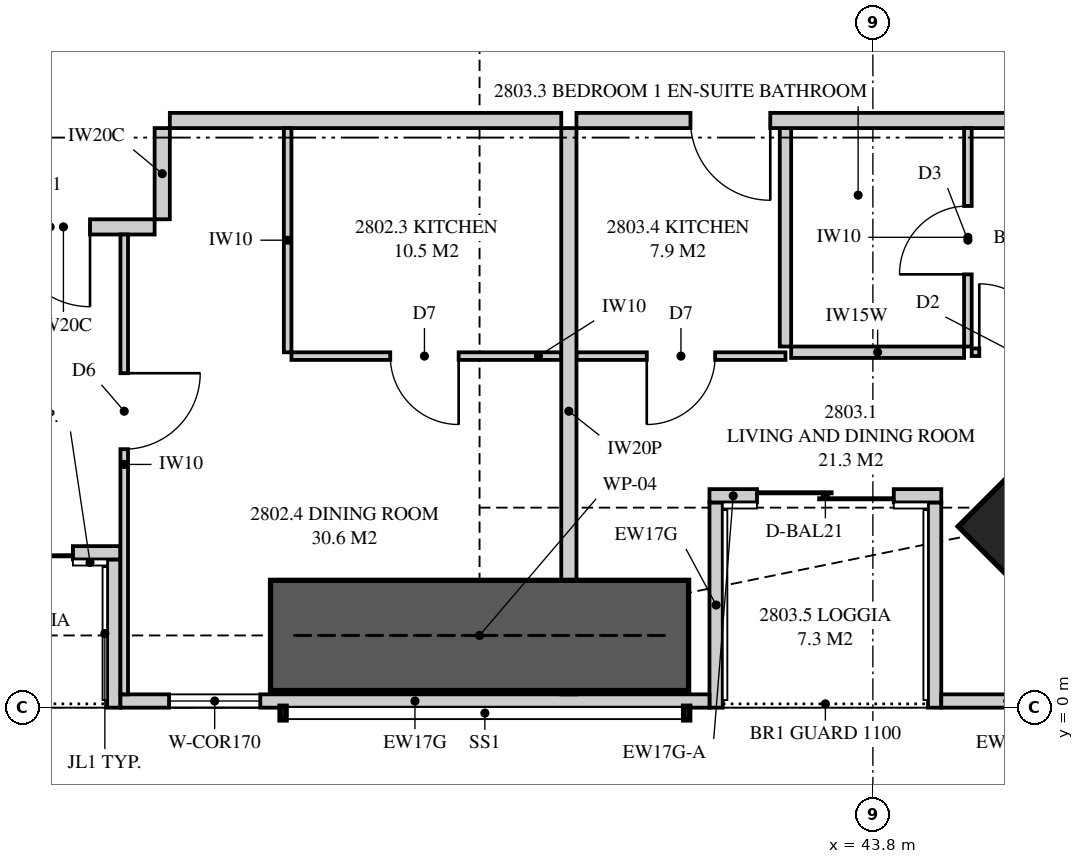
"""IFC4 building model, lengths in metres.
Left out: names, types, materials, properties, quantities, classifications, styles, units other than length and angle.
Written with IfcOpenShell. Run it as: python <this file> out.ifc"""

import sys

from ifc_helpers import new_model, si_unit, direction, frame, frame_2d, origin, origin_2d, place, context, subcontext, project, spatial, polyline, rectangle, outline, extrude, element, fill, save


model = new_model("IFC4")
c1 = context("Model", 3, precision=1e-05, world=origin(), true_north=direction((0.0, 1.0)))
c2 = subcontext(c1, "Body", "Model", "MODEL_VIEW")
j1 = project(units=[si_unit("LENGTHUNIT", "METRE"), si_unit("PLANEANGLEUNIT", "RADIAN")], contexts=[c1])
p1 = place(None, origin())
s1 = spatial("IfcSite", under=j1, at=p1, CompositionType="ELEMENT")
p2 = place(p1, origin())
s2 = spatial("IfcBuilding", under=s1, at=p2, CompositionType="ELEMENT")
p3 = place(p2, frame((0.0, 0.0, 104.85)))
s3 = spatial("IfcBuildingStorey", under=s2, at=p3, CompositionType="ELEMENT", Elevation=104.85)
p4 = place(p3, frame((46.869, 2.631, 0.0), z_axis=(0.0, 0.0, 1.0), x_axis=(-0.707106781187, 0.707106781187, 0.0)))
e1 = element("IfcColumn", 1, at=p4, inside=s3, PredefinedType="COLUMN", context=c2, shape_type="SweptSolid", body=[
    extrude(rectangle(XDim=2.4, YDim=3.1, at=origin_2d()), origin(), (0.0, 0.0, 1.0), 3.35),
])
p5 = place(p3, frame((33.9, 0.087, 0.0), z_axis=(0.0, 0.0, 1.0), x_axis=(1.0, 0.0, 0.0)))
e2 = element("IfcWall", 2, at=p5, inside=s3, PredefinedType="SOLIDWALL", context=c2, shape_type="SweptSolid", body=[
    extrude(outline(polyline([(0.0, 0.0), (7.75, 0.0), (7.75, 3.11), (4.928, 3.11), (4.928, 2.15), (4.883, 2.15), (4.883, 3.11), (4.725, 3.11), (4.725, 2.15), (0.0, 2.15), (0.0, 0.0)])), frame((0.0, 0.087, 0.0), z_axis=(0.0, -1.0, 0.0), x_axis=(1.0, 0.0, 0.0)), (0.0, 0.0, 1.0), 0.175),
])
p6 = place(p5, frame((0.64, 0.0, 0.4)))
e3 = element("IfcOpeningElement", 3, at=p6, cuts=e2, PredefinedType="OPENING", context=c2, shape_type="SweptSolid", body=[
    extrude(rectangle(XDim=1.2, YDim=1.7, at=frame_2d((0.6, 0.85))), frame((0.0, 0.097, 0.0), z_axis=(0.0, -1.0, 0.0), x_axis=(1.0, 0.0, 0.0)), (0.0, 0.0, 1.0), 0.195),
])
p7 = place(p3, frame((44.7, 0.087, 0.0), z_axis=(0.0, 0.0, 1.0), x_axis=(1.0, 0.0, 0.0)))
e4 = element("IfcWall", 4, at=p7, inside=s3, PredefinedType="SOLIDWALL", context=c2, shape_type="SweptSolid", body=[
    extrude(rectangle(XDim=1.749, YDim=0.175, at=frame_2d((0.875, 0.0))), origin(), (0.0, 0.0, 1.0), 3.11),
])
p8 = place(p3, frame((30.85, 2.038, 0.0), z_axis=(0.0, 0.0, 1.0), x_axis=(1.0, 0.0, 0.0)))
e5 = element("IfcWall", 5, at=p8, inside=s3, PredefinedType="SOLIDWALL", context=c2, shape_type="SweptSolid", body=[
    extrude(rectangle(XDim=3.05, YDim=0.175, at=frame_2d((1.525, 0.0))), origin(), (0.0, 0.0, 1.0), 3.11),
])
p9 = place(p8, frame((0.625, 0.0, 0.0)))
e6 = element("IfcOpeningElement", 6, at=p9, cuts=e5, PredefinedType="OPENING", context=c2, shape_type="SweptSolid", body=[
    extrude(rectangle(XDim=1.8, YDim=2.1, at=frame_2d((0.9, 1.05))), frame((0.0, 0.097, 0.0), z_axis=(0.0, -1.0, 0.0), x_axis=(1.0, 0.0, 0.0)), (0.0, 0.0, 1.0), 0.195),
])
p10 = place(p3, frame((33.812, 0.0, 0.0), z_axis=(0.0, 0.0, 1.0), x_axis=(0.0, 1.0, 0.0)))
e7 = element("IfcWall", 7, at=p10, inside=s3, PredefinedType="SOLIDWALL", context=c2, shape_type="SweptSolid", body=[
    extrude(outline(polyline([(0.0, 0.0), (1.95, 0.0), (1.95, 3.11), (1.75, 3.11), (1.75, 2.15), (0.15, 2.15), (0.15, 3.11), (0.0, 3.11), (0.0, 0.0)])), frame((0.0, 0.087, 0.0), z_axis=(0.0, -1.0, 0.0), x_axis=(1.0, 0.0, 0.0)), (0.0, 0.0, 1.0), 0.175),
])
p11 = place(p3, frame((41.65, 2.788, 0.0), z_axis=(0.0, 0.0, 1.0), x_axis=(1.0, 0.0, 0.0)))
e8 = element("IfcWall", 8, at=p11, inside=s3, PredefinedType="SOLIDWALL", context=c2, shape_type="SweptSolid", body=[
    extrude(rectangle(XDim=0.625, YDim=0.175, at=frame_2d((0.312, 0.0))), origin(), (0.0, 0.0, 1.0), 2.51),
])
p12 = place(p3, frame((42.275, 2.788, 0.0), z_axis=(0.0, 0.0, 1.0), x_axis=(1.0, 0.0, 0.0)))
e9 = element("IfcWall", 9, at=p12, inside=s3, PredefinedType="SOLIDWALL", context=c2, shape_type="SweptSolid", body=[
    extrude(rectangle(XDim=2.425, YDim=0.175, at=frame_2d((1.212, 0.0))), origin(), (0.0, 0.0, 1.0), 2.15),
])
p13 = place(p12, origin())
e10 = element("IfcOpeningElement", 10, at=p13, cuts=e9, PredefinedType="OPENING", context=c2, shape_type="SweptSolid", body=[
    extrude(rectangle(XDim=1.8, YDim=2.1, at=frame_2d((0.9, 1.05))), frame((0.0, 0.097, 0.0), z_axis=(0.0, -1.0, 0.0), x_axis=(1.0, 0.0, 0.0)), (0.0, 0.0, 1.0), 0.195),
])
p14 = place(p3, frame((41.738, 0.0, 0.0), z_axis=(0.0, 0.0, 1.0), x_axis=(0.0, 1.0, 0.0)))
e11 = element("IfcWall", 11, at=p14, inside=s3, PredefinedType="SOLIDWALL", context=c2, shape_type="SweptSolid", body=[
    extrude(outline(polyline([(0.0, 0.0), (2.7, 0.0), (2.7, 2.51), (2.419, 2.51), (2.419, 2.15), (0.75, 2.15), (0.75, 3.11), (0.0, 3.11), (0.0, 0.0)])), frame((0.0, 0.087, 0.0), z_axis=(0.0, -1.0, 0.0), x_axis=(1.0, 0.0, 0.0)), (0.0, 0.0, 1.0), 0.175),
])
p15 = place(p3, frame((44.613, 0.0, 0.0), z_axis=(0.0, 0.0, 1.0), x_axis=(0.0, 1.0, 0.0)))
e12 = element("IfcWall", 12, at=p15, inside=s3, PredefinedType="SOLIDWALL", context=c2, shape_type="SweptSolid", body=[
    extrude(outline(polyline([(0.0, 0.0), (2.7, 0.0), (2.7, 2.15), (1.337, 2.15), (1.337, 3.11), (0.0, 3.11), (0.0, 0.0)])), frame((0.0, 0.087, 0.0), z_axis=(0.0, -1.0, 0.0), x_axis=(1.0, 0.0, 0.0)), (0.0, 0.0, 1.0), 0.175),
])
p16 = place(p3, frame((39.8, 0.175, 0.0), z_axis=(0.0, 0.0, 1.0), x_axis=(0.0, 1.0, 0.0)))
e13 = element("IfcWall", 13, at=p16, inside=s3, PredefinedType="PARTITIONING", context=c2, shape_type="SweptSolid", body=[
    extrude(outline(polyline([(0.086, 3.11), (0.0, 3.11), (0.0, 0.0), (0.529, 0.0), (0.529, 0.701), (1.021, 0.701), (1.021, 0.0), (7.45, 0.0), (7.45, 3.11), (3.766, 3.11), (3.766, 2.51), (1.943, 2.51), (1.943, 2.15), (1.021, 2.15), (1.021, 1.449), (0.529, 1.449), (0.529, 2.15), (0.086, 2.15), (0.086, 3.11)])), frame((0.0, 0.1, 0.0), z_axis=(0.0, -1.0, 0.0), x_axis=(1.0, 0.0, 0.0)), (0.0, 0.0, 1.0), 0.2),
])
p17 = place(p3, frame((36.15, 4.625, 0.0), z_axis=(0.0, 0.0, 1.0), x_axis=(1.0, 0.0, 0.0)))
e14 = element("IfcWall", 14, at=p17, inside=s3, PredefinedType="PARTITIONING", context=c2, shape_type="SweptSolid", body=[
    extrude(outline(polyline([(0.0, 0.0), (3.55, 0.0), (3.55, 3.11), (2.762, 3.11), (2.762, 2.541), (2.188, 2.541), (2.188, 3.11), (0.0, 3.11), (0.0, 0.0)])), frame((0.0, 0.05, 0.0), z_axis=(0.0, -1.0, 0.0), x_axis=(1.0, 0.0, 0.0)), (0.0, 0.0, 1.0), 0.1),
])
p18 = place(p17, frame((1.3, 0.0, 0.0)))
e15 = element("IfcOpeningElement", 15, at=p18, cuts=e14, PredefinedType="OPENING", context=c2, shape_type="SweptSolid", body=[
    extrude(rectangle(XDim=0.9, YDim=2.1, at=frame_2d((0.45, 1.05))), frame((0.0, 0.06, 0.0), z_axis=(0.0, -1.0, 0.0), x_axis=(1.0, 0.0, 0.0)), (0.0, 0.0, 1.0), 0.12),
])
p19 = place(p3, frame((36.1, 4.675, 0.0), z_axis=(0.0, 0.0, 1.0), x_axis=(0.0, 1.0, 0.0)))
e16 = element("IfcWall", 16, at=p19, inside=s3, PredefinedType="PARTITIONING", context=c2, shape_type="SweptSolid", body=[
    extrude(rectangle(XDim=2.95, YDim=0.1, at=frame_2d((1.475, 0.0))), origin(), (0.0, 0.0, 1.0), 3.11),
])
p20 = place(p3, frame((33.95, 0.175, 0.0), z_axis=(0.0, 0.0, 1.0), x_axis=(0.0, 1.0, 0.0)))
e17 = element("IfcWall", 17, at=p20, inside=s3, PredefinedType="PARTITIONING", context=c2, shape_type="SweptSolid", body=[
    extrude(outline(polyline([(0.0, 0.0), (6.05, 0.0), (6.05, 3.11), (1.635, 3.11), (1.635, 2.15), (0.0, 2.15), (0.0, 3.11), (0.0, 0.0)])), frame((0.0, 0.05, 0.0), z_axis=(0.0, -1.0, 0.0), x_axis=(1.0, 0.0, 0.0)), (0.0, 0.0, 1.0), 0.1),
])
p21 = place(p20, frame((3.225, 0.0, 0.0)))
e18 = element("IfcOpeningElement", 18, at=p21, cuts=e17, PredefinedType="OPENING", context=c2, shape_type="SweptSolid", body=[
    extrude(rectangle(XDim=1.0, YDim=2.1, at=frame_2d((0.5, 1.05))), frame((0.0, 0.06, 0.0), z_axis=(0.0, -1.0, 0.0), x_axis=(1.0, 0.0, 0.0)), (0.0, 0.0, 1.0), 0.12),
])
p22 = place(p3, frame((39.9, 7.725, 0.0), z_axis=(0.0, 0.0, 1.0), x_axis=(1.0, 0.0, 0.0)))
e19 = element("IfcWall", 19, at=p22, inside=s3, PredefinedType="PARTITIONING", context=c2, shape_type="SweptSolid", body=[
    extrude(rectangle(XDim=6.125, YDim=0.2, at=frame_2d((3.062, 0.0))), origin(), (0.0, 0.0, 1.0), 3.11),
])
p23 = place(p22, frame((1.5, 0.0, 0.0)))
e20 = element("IfcOpeningElement", 20, at=p23, cuts=e19, PredefinedType="OPENING", context=c2, shape_type="SweptSolid", body=[
    extrude(rectangle(XDim=1.05, YDim=2.2, at=frame_2d((0.525, 1.1))), frame((0.0, 0.11, 0.0), z_axis=(0.0, -1.0, 0.0), x_axis=(1.0, 0.0, 0.0)), (0.0, 0.0, 1.0), 0.22),
])
p24 = place(p3, frame((45.05, 4.751, 0.0), z_axis=(0.0, 0.0, 1.0), x_axis=(0.0, 1.0, 0.0)))
e21 = element("IfcWall", 21, at=p24, inside=s3, PredefinedType="PARTITIONING", context=c2, shape_type="SweptSolid", body=[
    extrude(rectangle(XDim=2.874, YDim=0.1, at=frame_2d((1.437, 0.0))), origin(), (0.0, 0.0, 1.0), 3.11),
])
p25 = place(p24, frame((0.949, 0.0, 0.0)))
e22 = element("IfcOpeningElement", 22, at=p25, cuts=e21, PredefinedType="OPENING", context=c2, shape_type="SweptSolid", body=[
    extrude(rectangle(XDim=0.9, YDim=2.1, at=frame_2d((0.45, 1.05))), frame((0.0, 0.06, 0.0), z_axis=(0.0, -1.0, 0.0), x_axis=(1.0, 0.0, 0.0)), (0.0, 0.0, 1.0), 0.12),
])
p26 = place(p3, frame((45.1, 4.676, 0.0), z_axis=(0.0, 0.0, 1.0), x_axis=(1.0, 0.0, 0.0)))
e23 = element("IfcWall", 23, at=p26, inside=s3, PredefinedType="PARTITIONING", context=c2, shape_type="SweptSolid", body=[
    extrude(outline(polyline([(0.0, 0.0), (4.4, 0.0), (4.4, 3.11), (2.971, 3.11), (2.971, 2.15), (1.229, 2.15), (1.229, 3.11), (0.0, 3.11), (0.0, 0.0)])), frame((0.0, 0.05, 0.0), z_axis=(0.0, -1.0, 0.0), x_axis=(1.0, 0.0, 0.0)), (0.0, 0.0, 1.0), 0.1),
])
p27 = place(p26, frame((0.1, 0.0, 0.0)))
e24 = element("IfcOpeningElement", 24, at=p27, cuts=e23, PredefinedType="OPENING", context=c2, shape_type="SweptSolid", body=[
    extrude(rectangle(XDim=0.9, YDim=2.1, at=frame_2d((0.45, 1.05))), frame((0.0, 0.06, 0.0), z_axis=(0.0, -1.0, 0.0), x_axis=(1.0, 0.0, 0.0)), (0.0, 0.0, 1.0), 0.12),
])
p28 = place(p3, frame((42.725, 4.676, 0.0), z_axis=(0.0, 0.0, 1.0), x_axis=(1.0, 0.0, 0.0)))
e25 = element("IfcWall", 25, at=p28, inside=s3, PredefinedType="PLUMBINGWALL", context=c2, shape_type="SweptSolid", body=[
    extrude(rectangle(XDim=2.275, YDim=0.15, at=frame_2d((1.137, 0.0))), origin(), (0.0, 0.0, 1.0), 3.11),
])
p29 = place(p3, frame((42.65, 4.751, 0.0), z_axis=(0.0, 0.0, 1.0), x_axis=(0.0, 1.0, 0.0)))
e26 = element("IfcWall", 26, at=p29, inside=s3, PredefinedType="PLUMBINGWALL", context=c2, shape_type="SweptSolid", body=[
    extrude(rectangle(XDim=2.874, YDim=0.15, at=frame_2d((1.437, 0.0))), origin(), (0.0, 0.0, 1.0), 3.11),
])
p30 = place(p3, frame((39.9, 4.625, 0.0), z_axis=(0.0, 0.0, 1.0), x_axis=(1.0, 0.0, 0.0)))
e27 = element("IfcWall", 27, at=p30, inside=s3, PredefinedType="PARTITIONING", context=c2, shape_type="SweptSolid", body=[
    extrude(rectangle(XDim=2.75, YDim=0.1, at=frame_2d((1.375, 0.0))), origin(), (0.0, 0.0, 1.0), 3.11),
])
p31 = place(p30, frame((0.925, 0.0, 0.0)))
e28 = element("IfcOpeningElement", 28, at=p31, cuts=e27, PredefinedType="OPENING", context=c2, shape_type="SweptSolid", body=[
    extrude(rectangle(XDim=0.9, YDim=2.1, at=frame_2d((0.45, 1.05))), frame((0.0, 0.06, 0.0), z_axis=(0.0, -1.0, 0.0), x_axis=(1.0, 0.0, 0.0)), (0.0, 0.0, 1.0), 0.12),
])
p32 = place(p3, frame((34.55, 7.725, 0.0), z_axis=(0.0, 0.0, 1.0), x_axis=(1.0, 0.0, 0.0)))
e29 = element("IfcWall", 29, at=p32, inside=s3, PredefinedType="PARTITIONING", context=c2, shape_type="SweptSolid", body=[
    extrude(outline(polyline([(0.0, 0.0), (5.15, 0.0), (5.15, 3.11), (4.412, 3.11), (4.412, 2.541), (3.738, 2.541), (3.738, 3.11), (0.0, 3.11), (0.0, 0.0)])), frame((0.0, 0.1, 0.0), z_axis=(0.0, -1.0, 0.0), x_axis=(1.0, 0.0, 0.0)), (0.0, 0.0, 1.0), 0.2),
])
p33 = place(p3, frame((31.95, 6.325, 0.0), z_axis=(0.0, 0.0, 1.0), x_axis=(1.0, 0.0, 0.0)))
e30 = element("IfcWall", 30, at=p33, inside=s3, PredefinedType="PARTITIONING", context=c2, shape_type="SweptSolid", body=[
    extrude(rectangle(XDim=2.4, YDim=0.2, at=frame_2d((1.2, 0.0))), origin(), (0.0, 0.0, 1.0), 3.11),
])
p34 = place(p33, frame((0.5, 0.0, 0.0)))
e31 = element("IfcOpeningElement", 31, at=p34, cuts=e30, PredefinedType="OPENING", context=c2, shape_type="SweptSolid", body=[
    extrude(rectangle(XDim=1.05, YDim=2.2, at=frame_2d((0.525, 1.1))), frame((0.0, 0.11, 0.0), z_axis=(0.0, -1.0, 0.0), x_axis=(1.0, 0.0, 0.0)), (0.0, 0.0, 1.0), 0.22),
])
p35 = place(p3, frame((34.45, 7.625, 0.0), z_axis=(0.0, 0.0, 1.0), x_axis=(0.0, -1.0, 0.0)))
e32 = element("IfcWall", 32, at=p35, inside=s3, PredefinedType="PARTITIONING", context=c2, shape_type="SweptSolid", body=[
    extrude(rectangle(XDim=1.2, YDim=0.2, at=frame_2d((0.6, 0.0))), origin(), (0.0, 0.0, 1.0), 3.11),
])
p36 = place(p3, frame((35.875, 0.95, 0.0), z_axis=(0.0, 0.0, 1.0), x_axis=(1.0, 0.0, 0.0)))
e33 = element("IfcWall", 33, at=p36, inside=s3, PredefinedType="SHEAR", context=c2, shape_type="SweptSolid", body=[
    extrude(rectangle(XDim=5.5, YDim=1.45, at=frame_2d((2.75, 0.0))), origin(), (0.0, 0.0, 1.0), 3.35),
])
p37 = place(p9, origin())
e34 = element("IfcDoor", 34, at=p37, inside=s3, OperationType="SLIDING_TO_LEFT", PredefinedType="DOOR", context=c2, shape_type="SweptSolid", body=[
    extrude(rectangle(XDim=1.8, YDim=2.1, at=frame_2d((0.9, 1.05))), frame((0.0, 0.025, 0.0), z_axis=(0.0, -1.0, 0.0), x_axis=(1.0, 0.0, 0.0)), (0.0, 0.0, 1.0), 0.05),
])
fill(e6, e34)
p38 = place(p6, origin())
e35 = element("IfcWindow", 35, at=p38, inside=s3, PartitioningType="SINGLE_PANEL", PredefinedType="WINDOW", context=c2, shape_type="SweptSolid", body=[
    extrude(rectangle(XDim=1.2, YDim=1.7, at=frame_2d((0.6, 0.85))), frame((0.0, 0.03, 0.0), z_axis=(0.0, -1.0, 0.0), x_axis=(1.0, 0.0, 0.0)), (0.0, 0.0, 1.0), 0.06),
])
fill(e3, e35)
p39 = place(p13, origin())
e36 = element("IfcDoor", 36, at=p39, inside=s3, OperationType="SLIDING_TO_LEFT", PredefinedType="DOOR", context=c2, shape_type="SweptSolid", body=[
    extrude(rectangle(XDim=1.8, YDim=2.1, at=frame_2d((0.9, 1.05))), frame((0.0, 0.025, 0.0), z_axis=(0.0, -1.0, 0.0), x_axis=(1.0, 0.0, 0.0)), (0.0, 0.0, 1.0), 0.05),
])
fill(e10, e36)
p40 = place(p34, frame((1.05, 0.0, 0.0), z_axis=(0.0, 0.0, 1.0), x_axis=(-1.0, 0.0, 0.0)))
e37 = element("IfcDoor", 37, at=p40, inside=s3, OperationType="SINGLE_SWING_LEFT", PredefinedType="DOOR", context=c2, shape_type="SweptSolid", body=[
    extrude(rectangle(XDim=1.05, YDim=2.2, at=frame_2d((0.525, 1.1))), frame((0.0, 0.025, 0.0), z_axis=(0.0, -1.0, 0.0), x_axis=(1.0, 0.0, 0.0)), (0.0, 0.0, 1.0), 0.05),
])
fill(e31, e37)
p41 = place(p18, frame((0.9, 0.0, 0.0), z_axis=(0.0, 0.0, 1.0), x_axis=(-1.0, 0.0, 0.0)))
e38 = element("IfcDoor", 38, at=p41, inside=s3, OperationType="SINGLE_SWING_LEFT", PredefinedType="DOOR", context=c2, shape_type="SweptSolid", body=[
    extrude(rectangle(XDim=0.9, YDim=2.1, at=frame_2d((0.45, 1.05))), frame((0.0, 0.025, 0.0), z_axis=(0.0, -1.0, 0.0), x_axis=(1.0, 0.0, 0.0)), (0.0, 0.0, 1.0), 0.05),
])
fill(e15, e38)
p42 = place(p21, frame((1.0, 0.0, 0.0), z_axis=(0.0, 0.0, 1.0), x_axis=(-1.0, 0.0, 0.0)))
e39 = element("IfcDoor", 39, at=p42, inside=s3, OperationType="SINGLE_SWING_LEFT", PredefinedType="DOOR", context=c2, shape_type="SweptSolid", body=[
    extrude(rectangle(XDim=1.0, YDim=2.1, at=frame_2d((0.5, 1.05))), frame((0.0, 0.025, 0.0), z_axis=(0.0, -1.0, 0.0), x_axis=(1.0, 0.0, 0.0)), (0.0, 0.0, 1.0), 0.05),
])
fill(e18, e39)
p43 = place(p23, frame((1.05, 0.0, 0.0), z_axis=(0.0, 0.0, 1.0), x_axis=(-1.0, 0.0, 0.0)))
e40 = element("IfcDoor", 40, at=p43, inside=s3, OperationType="SINGLE_SWING_LEFT", PredefinedType="DOOR", context=c2, shape_type="SweptSolid", body=[
    extrude(rectangle(XDim=1.05, YDim=2.2, at=frame_2d((0.525, 1.1))), frame((0.0, 0.025, 0.0), z_axis=(0.0, -1.0, 0.0), x_axis=(1.0, 0.0, 0.0)), (0.0, 0.0, 1.0), 0.05),
])
fill(e20, e40)
p44 = place(p27, origin())
e41 = element("IfcDoor", 41, at=p44, inside=s3, OperationType="SINGLE_SWING_LEFT", PredefinedType="DOOR", context=c2, shape_type="SweptSolid", body=[
    extrude(rectangle(XDim=0.9, YDim=2.1, at=frame_2d((0.45, 1.05))), frame((0.0, 0.025, 0.0), z_axis=(0.0, -1.0, 0.0), x_axis=(1.0, 0.0, 0.0)), (0.0, 0.0, 1.0), 0.05),
])
fill(e24, e41)
p45 = place(p25, origin())
e42 = element("IfcDoor", 42, at=p45, inside=s3, OperationType="SINGLE_SWING_LEFT", PredefinedType="DOOR", context=c2, shape_type="SweptSolid", body=[
    extrude(rectangle(XDim=0.9, YDim=2.1, at=frame_2d((0.45, 1.05))), frame((0.0, 0.025, 0.0), z_axis=(0.0, -1.0, 0.0), x_axis=(1.0, 0.0, 0.0)), (0.0, 0.0, 1.0), 0.05),
])
fill(e22, e42)
p46 = place(p31, frame((0.9, 0.0, 0.0), z_axis=(0.0, 0.0, 1.0), x_axis=(-1.0, 0.0, 0.0)))
e43 = element("IfcDoor", 43, at=p46, inside=s3, OperationType="SINGLE_SWING_RIGHT", PredefinedType="DOOR", context=c2, shape_type="SweptSolid", body=[
    extrude(rectangle(XDim=0.9, YDim=2.1, at=frame_2d((0.45, 1.05))), frame((0.0, 0.025, 0.0), z_axis=(0.0, -1.0, 0.0), x_axis=(1.0, 0.0, 0.0)), (0.0, 0.0, 1.0), 0.05),
])
fill(e28, e43)
save(model, sys.argv[1])
